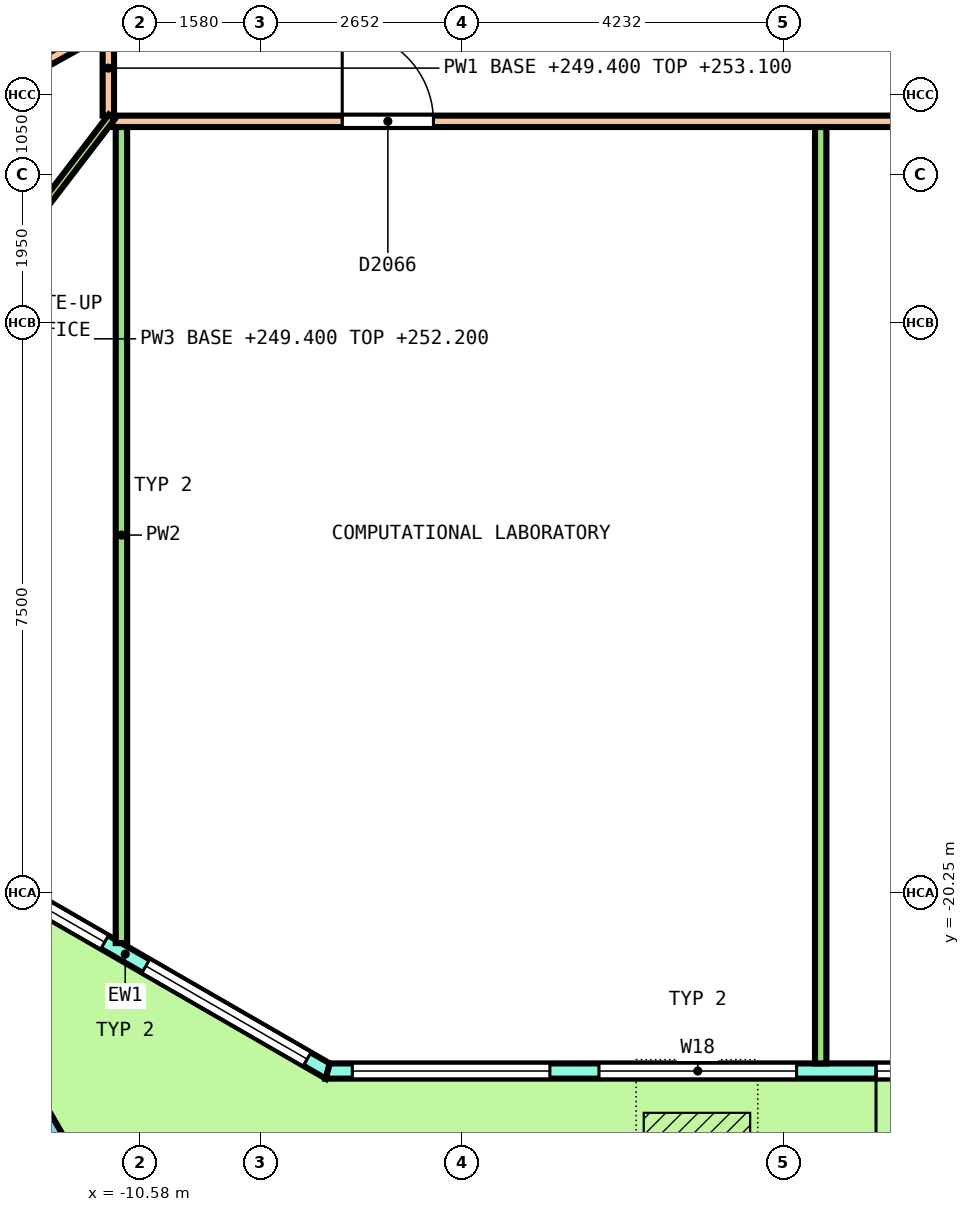
"""IFC4 building model, lengths in metres.
Left out: names, types, materials, properties, quantities, classifications, styles, units other than length and angle.
Written with IfcOpenShell. Run it as: python <this file> out.ifc"""

import sys

from ifc_helpers import new_model, si_unit, direction, frame, frame_2d, origin, origin_2d, place, context, subcontext, project, spatial, polyline, rectangle, outline, extrude, element, fill, save


model = new_model("IFC4")
c1 = context("Model", 3, precision=1e-05, world=origin(), true_north=direction((0.0, 1.0)))
c2 = subcontext(c1, "Body", "Model", "MODEL_VIEW")
j1 = project(units=[si_unit("LENGTHUNIT", "METRE"), si_unit("PLANEANGLEUNIT", "RADIAN")], contexts=[c1])
p1 = place(None, origin())
s1 = spatial("IfcSite", under=j1, at=p1, CompositionType="ELEMENT")
p2 = place(p1, origin())
s2 = spatial("IfcBuilding", under=s1, at=p2, CompositionType="ELEMENT")
p3 = place(p2, frame((0.0, 0.0, 249.4)))
s3 = spatial("IfcBuildingStorey", under=s2, at=p3, CompositionType="ELEMENT", Elevation=249.4)
p4 = place(p3, frame((-12.178, -23.481, 0.0), z_axis=(0.018096735828, -0.031434700382, 0.999341967379), x_axis=(0.865479556299, -0.499959233414, -0.031399085223)))
e1 = element("IfcColumn", 1, at=p4, inside=s3, PredefinedType="COLUMN", context=c2, shape_type="SweptSolid", body=[
    extrude(rectangle(XDim=1.05, YDim=1.05, at=origin_2d()), origin(), (0.0, 0.0, 1.0), 3.643),
])
p5 = place(p3, frame((-13.442, -19.518, 0.0), z_axis=(0.0, 0.0, 1.0), x_axis=(0.866012465712, -0.500022408728, 0.0)))
e2 = element("IfcWall", 2, at=p5, inside=s3, PredefinedType="SOLIDWALL", context=c2, shape_type="SweptSolid", body=[
    extrude(outline(polyline([(-0.027, -0.1), (1.008, -0.1), (2.042, -0.1), (3.077, -0.1), (4.111, -0.1), (5.146, -0.1), (6.18, -0.1), (6.126, 0.1), (5.11, 0.1), (4.093, 0.1), (3.077, 0.1), (2.06, 0.1), (1.043, 0.1), (0.027, 0.1), (-0.027, -0.1)])), origin(), (0.0, 0.0, 1.0), 3.7),
])
p6 = place(p5, frame((0.313, 0.0, 0.1)))
e3 = element("IfcOpeningElement", 3, at=p6, cuts=e2, PredefinedType="OPENING", context=c2, shape_type="SweptSolid", body=[
    extrude(rectangle(XDim=2.45, YDim=2.65, at=frame_2d((1.225, 1.325))), frame((0.0, 0.11, 0.0), z_axis=(0.0, -1.0, 0.0), x_axis=(1.0, 0.0, 0.0)), (0.0, 0.0, 1.0), 0.22),
])
p7 = place(p5, frame((3.39, 0.0, 0.1)))
e4 = element("IfcOpeningElement", 4, at=p7, cuts=e2, PredefinedType="OPENING", context=c2, shape_type="SweptSolid", body=[
    extrude(rectangle(XDim=2.45, YDim=2.65, at=frame_2d((1.225, 1.325))), frame((0.0, 0.11, 0.0), z_axis=(0.0, -1.0, 0.0), x_axis=(1.0, 0.0, 0.0)), (0.0, 0.0, 1.0), 0.22),
])
p8 = place(p3, frame((-8.113, -22.594, 0.0), z_axis=(0.0, 0.0, 1.0), x_axis=(1.0, 0.0, 0.0)))
e5 = element("IfcWall", 5, at=p8, inside=s3, PredefinedType="SOLIDWALL", context=c2, shape_type="SweptSolid", body=[
    extrude(outline(polyline([(-0.027, -0.1), (0.991, -0.1), (2.008, -0.1), (3.026, -0.1), (4.043, -0.1), (5.061, -0.1), (6.078, -0.1), (7.096, -0.1), (8.113, -0.1), (9.131, -0.1), (10.148, -0.1), (11.166, -0.1), (12.183, -0.1), (13.201, -0.1), (14.218, -0.1), (15.236, -0.1), (16.253, -0.1), (16.2, 0.1), (15.189, 0.1), (14.178, 0.1), (13.167, 0.1), (12.156, 0.1), (11.146, 0.1), (10.135, 0.1), (9.124, 0.1), (8.113, 0.1), (7.103, 0.1), (6.092, 0.1), (5.081, 0.1), (4.07, 0.1), (3.059, 0.1), (2.048, 0.1), (1.038, 0.1), (0.027, 0.1), (-0.027, -0.1)])), origin(), (0.0, 0.0, 1.0), 3.7),
])
p9 = place(p8, frame((0.323, 0.0, 0.1)))
e6 = element("IfcOpeningElement", 6, at=p9, cuts=e5, PredefinedType="OPENING", context=c2, shape_type="SweptSolid", body=[
    extrude(rectangle(XDim=2.6, YDim=2.65, at=frame_2d((1.3, 1.325))), frame((0.0, 0.11, 0.0), z_axis=(0.0, -1.0, 0.0), x_axis=(1.0, 0.0, 0.0)), (0.0, 0.0, 1.0), 0.22),
])
p10 = place(p8, frame((3.568, 0.0, 0.1)))
e7 = element("IfcOpeningElement", 7, at=p10, cuts=e5, PredefinedType="OPENING", context=c2, shape_type="SweptSolid", body=[
    extrude(rectangle(XDim=2.6, YDim=2.65, at=frame_2d((1.3, 1.325))), frame((0.0, 0.11, 0.0), z_axis=(0.0, -1.0, 0.0), x_axis=(1.0, 0.0, 0.0)), (0.0, 0.0, 1.0), 0.22),
])
p11 = place(p8, frame((7.213, 0.0, 0.0)))
e8 = element("IfcOpeningElement", 8, at=p11, cuts=e5, PredefinedType="OPENING", context=c2, shape_type="SweptSolid", body=[
    extrude(rectangle(XDim=1.8, YDim=2.4, at=frame_2d((0.9, 1.2))), frame((0.0, 0.11, 0.0), z_axis=(0.0, -1.0, 0.0), x_axis=(1.0, 0.0, 0.0)), (0.0, 0.0, 1.0), 0.22),
])
p12 = place(p8, frame((7.213, 0.0, 2.55)))
e9 = element("IfcOpeningElement", 9, at=p12, cuts=e5, PredefinedType="OPENING", context=c2, shape_type="SweptSolid", body=[
    extrude(rectangle(XDim=1.8, YDim=0.2, at=frame_2d((0.9, 0.1))), frame((0.0, 0.11, 0.0), z_axis=(0.0, -1.0, 0.0), x_axis=(1.0, 0.0, 0.0)), (0.0, 0.0, 1.0), 0.22),
])
p13 = place(p8, frame((10.059, 0.0, 0.1)))
e10 = element("IfcOpeningElement", 10, at=p13, cuts=e5, PredefinedType="OPENING", context=c2, shape_type="SweptSolid", body=[
    extrude(rectangle(XDim=2.6, YDim=2.65, at=frame_2d((1.3, 1.325))), frame((0.0, 0.11, 0.0), z_axis=(0.0, -1.0, 0.0), x_axis=(1.0, 0.0, 0.0)), (0.0, 0.0, 1.0), 0.22),
])
p14 = place(p8, frame((13.304, 0.0, 0.1)))
e11 = element("IfcOpeningElement", 11, at=p14, cuts=e5, PredefinedType="OPENING", context=c2, shape_type="SweptSolid", body=[
    extrude(rectangle(XDim=2.6, YDim=2.65, at=frame_2d((1.3, 1.325))), frame((0.0, 0.11, 0.0), z_axis=(0.0, -1.0, 0.0), x_axis=(1.0, 0.0, 0.0)), (0.0, 0.0, 1.0), 0.22),
])
p15 = place(p3, frame((-17.424, -12.421, 0.0), z_axis=(0.0, 0.0, 1.0), x_axis=(0.874033768058, 0.485865179134, 0.0)))
e12 = element("IfcWall", 12, at=p15, inside=s3, PredefinedType="PARTITIONING", context=c2, shape_type="SweptSolid", body=[
    extrude(rectangle(XDim=7.274, YDim=0.15, at=frame_2d((3.637, 0.0))), origin(), (0.0, 0.0, 1.0), 2.8),
])
p16 = place(p15, frame((1.762, 0.0, 0.0)))
e13 = element("IfcOpeningElement", 13, at=p16, cuts=e12, PredefinedType="OPENING", context=c2, shape_type="SweptSolid", body=[
    extrude(rectangle(XDim=1.0, YDim=2.1, at=frame_2d((0.5, 1.05))), frame((0.0, 0.085, 0.0), z_axis=(0.0, -1.0, 0.0), x_axis=(1.0, 0.0, 0.0)), (0.0, 0.0, 1.0), 0.17),
])
p17 = place(p3, frame((-11.0, -10.025, 0.0), z_axis=(0.0, 0.0, 1.0), x_axis=(0.0, 1.0, 0.0)))
e14 = element("IfcWall", 14, at=p17, inside=s3, PredefinedType="PARTITIONING", context=c2, shape_type="SweptSolid", body=[
    extrude(rectangle(XDim=1.25, YDim=0.15, at=frame_2d((0.625, 0.0))), origin(), (0.0, 0.0, 1.0), 3.7),
])
p18 = place(p3, frame((-10.95, -10.1, 0.0), z_axis=(0.0, 0.0, 1.0), x_axis=(1.0, 0.0, 0.0)))
e15 = element("IfcWall", 15, at=p18, inside=s3, PredefinedType="PARTITIONING", context=c2, shape_type="SweptSolid", body=[
    extrude(rectangle(XDim=21.875, YDim=0.15, at=frame_2d((10.938, 0.0))), origin(), (0.0, 0.0, 1.0), 2.8),
])
p19 = place(p18, frame((3.027, 0.0, 0.0)))
e16 = element("IfcOpeningElement", 16, at=p19, cuts=e15, PredefinedType="OPENING", context=c2, shape_type="SweptSolid", body=[
    extrude(rectangle(XDim=1.2, YDim=2.1, at=frame_2d((0.6, 1.05))), frame((0.0, 0.085, 0.0), z_axis=(0.0, -1.0, 0.0), x_axis=(1.0, 0.0, 0.0)), (0.0, 0.0, 1.0), 0.17),
])
p20 = place(p18, frame((14.786, 0.0, 0.0)))
e17 = element("IfcOpeningElement", 17, at=p20, cuts=e15, PredefinedType="OPENING", context=c2, shape_type="SweptSolid", body=[
    extrude(rectangle(XDim=1.2, YDim=2.1, at=frame_2d((0.6, 1.05))), frame((0.0, 0.085, 0.0), z_axis=(0.0, -1.0, 0.0), x_axis=(1.0, 0.0, 0.0)), (0.0, 0.0, 1.0), 0.17),
])
p21 = place(p18, frame((20.194, 0.0, 0.0)))
e18 = element("IfcOpeningElement", 18, at=p21, cuts=e15, PredefinedType="OPENING", context=c2, shape_type="SweptSolid", body=[
    extrude(rectangle(XDim=1.0, YDim=2.1, at=frame_2d((0.5, 1.05))), frame((0.0, 0.085, 0.0), z_axis=(0.0, -1.0, 0.0), x_axis=(1.0, 0.0, 0.0)), (0.0, 0.0, 1.0), 0.17),
])
p22 = place(p3, frame((-10.828, -20.912, 0.0), z_axis=(0.0, 0.0, 1.0), x_axis=(0.0, 1.0, 0.0)))
e19 = element("IfcWall", 19, at=p22, inside=s3, PredefinedType="PARTITIONING", context=c2, shape_type="SweptSolid", body=[
    extrude(rectangle(XDim=10.737, YDim=0.15, at=frame_2d((5.368, 0.0))), origin(), (0.0, 0.0, 1.0), 2.8),
])
p23 = place(p3, frame((-1.628, -22.494, 0.0), z_axis=(0.0, 0.0, 1.0), x_axis=(0.0, 1.0, 0.0)))
e20 = element("IfcWall", 20, at=p23, inside=s3, PredefinedType="PARTITIONING", context=c2, shape_type="SweptSolid", body=[
    extrude(rectangle(XDim=12.319, YDim=0.15, at=frame_2d((6.16, 0.0))), origin(), (0.0, 0.0, 1.0), 2.8),
])
p24 = place(p3, frame((-15.425, -15.883, 0.0), z_axis=(0.0, 0.0, 1.0), x_axis=(0.607734612905, 0.79414018931, 0.0)))
e21 = element("IfcWall", 21, at=p24, inside=s3, PredefinedType="PARTITIONING", context=c2, shape_type="SweptSolid", body=[
    extrude(rectangle(XDim=7.357, YDim=0.1, at=frame_2d((3.678, 0.0))), origin(), (0.0, 0.0, 1.0), 2.8),
])
p25 = place(p24, frame((3.141, 0.0, 0.0)))
e22 = element("IfcOpeningElement", 22, at=p25, cuts=e21, PredefinedType="OPENING", context=c2, shape_type="SweptSolid", body=[
    extrude(rectangle(XDim=1.0, YDim=2.1, at=frame_2d((0.5, 1.05))), frame((0.0, 0.06, 0.0), z_axis=(0.0, -1.0, 0.0), x_axis=(1.0, 0.0, 0.0)), (0.0, 0.0, 1.0), 0.12),
])
p26 = place(p6, origin())
e23 = element("IfcWindow", 23, at=p26, inside=s3, PartitioningType="SINGLE_PANEL", PredefinedType="WINDOW", context=c2, shape_type="SweptSolid", body=[
    extrude(rectangle(XDim=2.45, YDim=2.65, at=frame_2d((1.225, 1.325))), frame((0.0, 0.03, 0.0), z_axis=(0.0, -1.0, 0.0), x_axis=(1.0, 0.0, 0.0)), (0.0, 0.0, 1.0), 0.06),
])
fill(e3, e23)
p27 = place(p7, origin())
e24 = element("IfcWindow", 24, at=p27, inside=s3, PartitioningType="SINGLE_PANEL", PredefinedType="WINDOW", context=c2, shape_type="SweptSolid", body=[
    extrude(rectangle(XDim=2.45, YDim=2.65, at=frame_2d((1.225, 1.325))), frame((0.0, 0.03, 0.0), z_axis=(0.0, -1.0, 0.0), x_axis=(1.0, 0.0, 0.0)), (0.0, 0.0, 1.0), 0.06),
])
fill(e4, e24)
p28 = place(p9, origin())
e25 = element("IfcWindow", 25, at=p28, inside=s3, PartitioningType="SINGLE_PANEL", PredefinedType="WINDOW", context=c2, shape_type="SweptSolid", body=[
    extrude(rectangle(XDim=2.6, YDim=2.65, at=frame_2d((1.3, 1.325))), frame((0.0, 0.03, 0.0), z_axis=(0.0, -1.0, 0.0), x_axis=(1.0, 0.0, 0.0)), (0.0, 0.0, 1.0), 0.06),
])
fill(e6, e25)
p29 = place(p10, origin())
e26 = element("IfcWindow", 26, at=p29, inside=s3, PartitioningType="SINGLE_PANEL", PredefinedType="WINDOW", context=c2, shape_type="SweptSolid", body=[
    extrude(rectangle(XDim=2.6, YDim=2.65, at=frame_2d((1.3, 1.325))), frame((0.0, 0.03, 0.0), z_axis=(0.0, -1.0, 0.0), x_axis=(1.0, 0.0, 0.0)), (0.0, 0.0, 1.0), 0.06),
])
fill(e7, e26)
p30 = place(p11, origin())
e27 = element("IfcDoor", 27, at=p30, inside=s3, OperationType="DOUBLE_DOOR_SINGLE_SWING", PredefinedType="DOOR", context=c2, shape_type="SweptSolid", body=[
    extrude(rectangle(XDim=1.8, YDim=2.4, at=frame_2d((0.9, 1.2))), frame((0.0, 0.025, 0.0), z_axis=(0.0, -1.0, 0.0), x_axis=(1.0, 0.0, 0.0)), (0.0, 0.0, 1.0), 0.05),
])
fill(e8, e27)
p31 = place(p12, origin())
e28 = element("IfcWindow", 28, at=p31, inside=s3, PartitioningType="SINGLE_PANEL", PredefinedType="WINDOW", context=c2, shape_type="SweptSolid", body=[
    extrude(rectangle(XDim=1.8, YDim=0.2, at=frame_2d((0.9, 0.1))), frame((0.0, 0.03, 0.0), z_axis=(0.0, -1.0, 0.0), x_axis=(1.0, 0.0, 0.0)), (0.0, 0.0, 1.0), 0.06),
])
fill(e9, e28)
p32 = place(p19, origin())
e29 = element("IfcDoor", 29, at=p32, inside=s3, OperationType="DOUBLE_DOOR_SINGLE_SWING", PredefinedType="DOOR", context=c2, shape_type="SweptSolid", body=[
    extrude(rectangle(XDim=1.2, YDim=2.1, at=frame_2d((0.6, 1.05))), frame((0.0, 0.025, 0.0), z_axis=(0.0, -1.0, 0.0), x_axis=(1.0, 0.0, 0.0)), (0.0, 0.0, 1.0), 0.05),
])
fill(e16, e29)
save(model, sys.argv[1])
